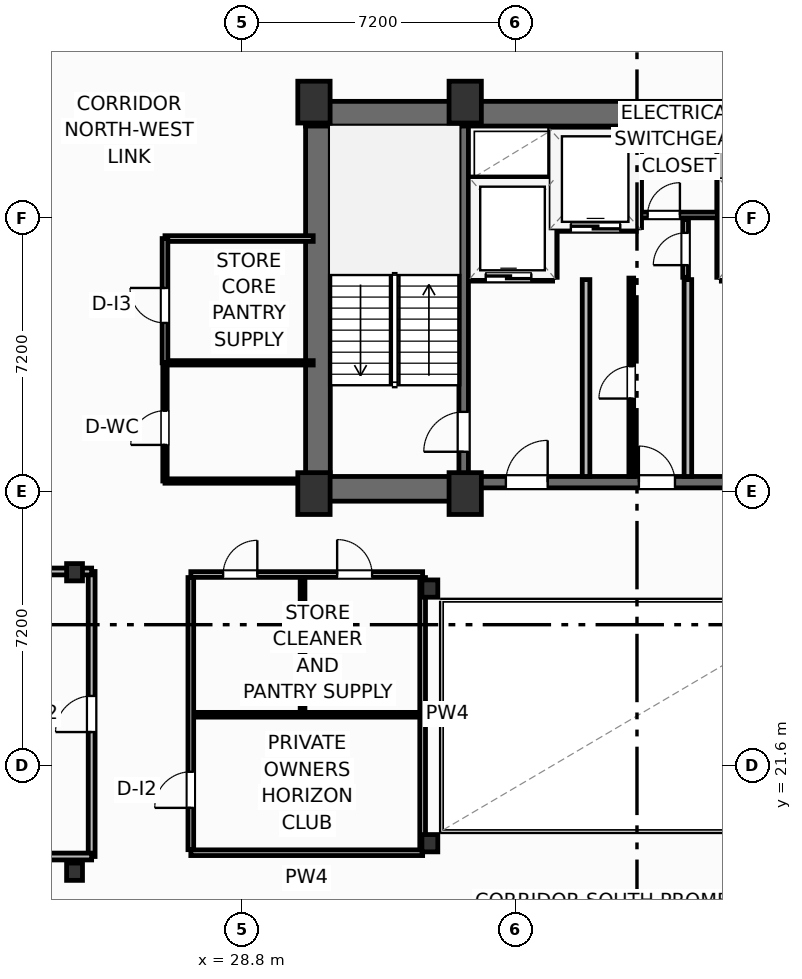
"""IFC4 building model, lengths in metres.
Left out: names, types, materials, properties, quantities, classifications, styles, units other than length and angle.
Written with IfcOpenShell. Run it as: python <this file> out.ifc"""

import sys

from ifc_helpers import new_model, si_unit, direction, frame, frame_2d, origin, origin_2d, place, context, subcontext, project, spatial, rectangle, i_section, extrude, element, fill, save


model = new_model("IFC4")
c1 = context("Model", 3, precision=1e-05, world=origin(), true_north=direction((0.0, 1.0)))
c2 = subcontext(c1, "Body", "Model", "MODEL_VIEW")
j1 = project(units=[si_unit("LENGTHUNIT", "METRE"), si_unit("PLANEANGLEUNIT", "RADIAN")], contexts=[c1])
p1 = place(None, origin())
s1 = spatial("IfcSite", under=j1, at=p1, CompositionType="ELEMENT")
p2 = place(p1, origin())
s2 = spatial("IfcBuilding", under=s1, at=p2, CompositionType="ELEMENT")
p3 = place(p2, frame((0.0, 0.0, 174.6)))
s3 = spatial("IfcBuildingStorey", under=s2, at=p3, CompositionType="ELEMENT", Elevation=174.6)
for number, where, z_axis, x_axis in (
    (1, (30.7, 28.75, 0.0), (0.0, 0.0, 1.0), (1.0, 0.0, 0.0)),
    (2, (34.68, 28.75, 0.0), (0.0, 0.0, 1.0), (1.0, 0.0, 0.0)),
    (3, (30.7, 39.05, 0.0), (0.0, 0.0, 1.0), (1.0, 0.0, 0.0)),
    (4, (34.68, 39.05, 0.0), (0.0, 0.0, 1.0), (1.0, 0.0, 0.0)),
):
    element("IfcColumn", number, at=place(p3, frame(where, z_axis=z_axis, x_axis=x_axis)), inside=s3, PredefinedType="COLUMN", context=c2, shape_type="SweptSolid", body=[
        extrude(rectangle(XDim=0.85, YDim=1.1, at=origin_2d()), origin(), (0.0, 0.0, 1.0), 3.7),
    ])
for number, where, z_axis, x_axis in (
    (5, (33.75, 19.55, 0.0), (0.0, 0.0, 1.0), (1.0, 0.0, 0.0)),
    (6, (33.75, 26.25, 0.0), (0.0, 0.0, 1.0), (1.0, 0.0, 0.0)),
    (7, (24.4, 18.8, 0.0), (0.0, 0.0, 1.0), (1.0, 0.0, 0.0)),
    (8, (24.4, 26.68, 0.0), (0.0, 0.0, 1.0), (1.0, 0.0, 0.0)),
):
    element("IfcColumn", number, at=place(p3, frame(where, z_axis=z_axis, x_axis=x_axis)), inside=s3, PredefinedType="COLUMN", context=c2, shape_type="SweptSolid", body=[
        extrude(i_section(OverallWidth=0.418, OverallDepth=0.455, WebThickness=0.042, FlangeThickness=0.068, FilletRadius=0.025, at=origin_2d()), origin(), (0.0, 0.0, 1.0), 3.7),
    ])
p4 = place(p3, frame((30.48, 38.745, 0.0), z_axis=(0.0, 0.0, 1.0), x_axis=(1.0, 0.0, 0.0)))
e9 = element("IfcWall", 9, at=p4, inside=s3, PredefinedType="SHEAR", context=c2, shape_type="SweptSolid", body=[
    extrude(rectangle(XDim=17.44, YDim=0.65, at=frame_2d((8.72, 0.0))), origin(), (0.0, 0.0, 1.0), 3.45),
])
p5 = place(p3, frame((30.805, 29.2, 0.0), z_axis=(0.0, 0.0, 1.0), x_axis=(0.0, 1.0, 0.0)))
e10 = element("IfcWall", 10, at=p5, inside=s3, PredefinedType="SHEAR", context=c2, shape_type="SweptSolid", body=[
    extrude(rectangle(XDim=9.22, YDim=0.65, at=frame_2d((4.61, 0.0))), origin(), (0.0, 0.0, 1.0), 3.45),
])
p6 = place(p3, frame((30.48, 28.875, 0.0), z_axis=(0.0, 0.0, 1.0), x_axis=(1.0, 0.0, 0.0)))
e11 = element("IfcWall", 11, at=p6, inside=s3, PredefinedType="SHEAR", context=c2, shape_type="SweptSolid", body=[
    extrude(rectangle(XDim=4.32, YDim=0.65, at=frame_2d((2.16, 0.0))), origin(), (0.0, 0.0, 1.0), 3.45),
])
p7 = place(p3, frame((34.8, 29.05, 0.0), z_axis=(0.0, 0.0, 1.0), x_axis=(1.0, 0.0, 0.0)))
e12 = element("IfcWall", 12, at=p7, inside=s3, PredefinedType="SHEAR", context=c2, shape_type="SweptSolid", body=[
    extrude(rectangle(XDim=8.8, YDim=0.3, at=frame_2d((4.4, 0.0))), origin(), (0.0, 0.0, 1.0), 3.45),
])
p8 = place(p7, frame((0.95, 0.0, 0.0)))
e13 = element("IfcOpeningElement", 13, at=p8, cuts=e12, PredefinedType="OPENING", context=c2, shape_type="SweptSolid", body=[
    extrude(rectangle(XDim=1.1, YDim=2.15, at=frame_2d((0.55, 1.075))), frame((0.0, 0.16, 0.0), z_axis=(0.0, -1.0, 0.0), x_axis=(1.0, 0.0, 0.0)), (0.0, 0.0, 1.0), 0.32),
])
p9 = place(p7, frame((6.75, 0.0, 0.0)))
e14 = element("IfcOpeningElement", 14, at=p9, cuts=e12, PredefinedType="OPENING", context=c2, shape_type="SweptSolid", body=[
    extrude(rectangle(XDim=1.1, YDim=2.15, at=frame_2d((0.55, 1.075))), frame((0.0, 0.16, 0.0), z_axis=(0.0, -1.0, 0.0), x_axis=(1.0, 0.0, 0.0)), (0.0, 0.0, 1.0), 0.32),
])
p10 = place(p7, frame((4.45, 0.0, 0.0)))
e15 = element("IfcOpeningElement", 15, at=p10, cuts=e12, PredefinedType="OPENING", context=c2, shape_type="SweptSolid", body=[
    extrude(rectangle(XDim=0.95, YDim=2.15, at=frame_2d((0.475, 1.075))), frame((0.0, 0.16, 0.0), z_axis=(0.0, -1.0, 0.0), x_axis=(1.0, 0.0, 0.0)), (0.0, 0.0, 1.0), 0.32),
])
p11 = place(p3, frame((34.64, 29.2, 0.0), z_axis=(0.0, 0.0, 1.0), x_axis=(0.0, 1.0, 0.0)))
e16 = element("IfcWall", 16, at=p11, inside=s3, PredefinedType="SHEAR", context=c2, shape_type="SweptSolid", body=[
    extrude(rectangle(XDim=9.22, YDim=0.25, at=frame_2d((4.61, 0.0))), origin(), (0.0, 0.0, 1.0), 3.45),
])
p12 = place(p11, frame((0.65, 0.0, 0.0)))
e17 = element("IfcOpeningElement", 17, at=p12, cuts=e16, PredefinedType="OPENING", context=c2, shape_type="SweptSolid", body=[
    extrude(rectangle(XDim=1.05, YDim=2.15, at=frame_2d((0.525, 1.075))), frame((0.0, 0.135, 0.0), z_axis=(0.0, -1.0, 0.0), x_axis=(1.0, 0.0, 0.0)), (0.0, 0.0, 1.0), 0.27),
])
p13 = place(p3, frame((24.85, 19.2, 0.0), z_axis=(0.0, 0.0, 1.0), x_axis=(0.0, 1.0, 0.0)))
e18 = element("IfcWall", 18, at=p13, inside=s3, PredefinedType="PARTITIONING", context=c2, shape_type="SweptSolid", body=[
    extrude(rectangle(XDim=7.5, YDim=0.18, at=frame_2d((3.75, 0.0))), origin(), (0.0, 0.0, 1.0), 3.45),
])
p14 = place(p13, frame((3.275, 0.0, 0.0)))
e19 = element("IfcOpeningElement", 19, at=p14, cuts=e18, PredefinedType="OPENING", context=c2, shape_type="SweptSolid", body=[
    extrude(rectangle(XDim=0.95, YDim=2.05, at=frame_2d((0.475, 1.025))), frame((0.0, 0.1, 0.0), z_axis=(0.0, -1.0, 0.0), x_axis=(1.0, 0.0, 0.0)), (0.0, 0.0, 1.0), 0.2),
])
p15 = place(p3, frame((4.562, 19.2, 0.0), z_axis=(0.0, 0.0, 1.0), x_axis=(1.0, 0.0, 0.0)))
e20 = element("IfcWall", 20, at=p15, inside=s3, PredefinedType="PARTITIONING", context=c2, shape_type="SweptSolid", body=[
    extrude(rectangle(XDim=20.288, YDim=0.18, at=frame_2d((10.144, 0.0))), origin(), (0.0, 0.0, 1.0), 3.45),
])
p16 = place(p3, frame((3.653, 26.7, 0.0), z_axis=(0.0, 0.0, 1.0), x_axis=(1.0, 0.0, 0.0)))
e21 = element("IfcWall", 21, at=p16, inside=s3, PredefinedType="PARTITIONING", context=c2, shape_type="SweptSolid", body=[
    extrude(rectangle(XDim=21.197, YDim=0.18, at=frame_2d((10.599, 0.0))), origin(), (0.0, 0.0, 1.0), 2.662),
])
for number, where, z_axis, x_axis in (
    (22, (37.86, 29.2, 0.0), (0.0, 0.0, 1.0), (0.0, 1.0, 0.0)),
    (23, (40.54, 29.2, 0.0), (0.0, 0.0, 1.0), (0.0, 1.0, 0.0)),
):
    element("IfcWall", number, at=place(p3, frame(where, z_axis=z_axis, x_axis=x_axis)), inside=s3, PredefinedType="PARTITIONING", context=c2, shape_type="SweptSolid", body=[
        extrude(rectangle(XDim=5.18, YDim=0.2, at=frame_2d((2.59, 0.0))), origin(), (0.0, 0.0, 1.0), 3.45),
    ])
p17 = place(p3, frame((34.8, 34.44, 0.0), z_axis=(0.0, 0.0, 1.0), x_axis=(1.0, 0.0, 0.0)))
e24 = element("IfcWall", 24, at=p17, inside=s3, PredefinedType="PARTITIONING", context=c2, shape_type="SweptSolid", body=[
    extrude(rectangle(XDim=2.18, YDim=0.2, at=frame_2d((1.09, 0.0))), origin(), (0.0, 0.0, 1.0), 3.45),
])
p18 = place(p17, frame((0.42, 0.0, 0.0)))
e25 = element("IfcOpeningElement", 25, at=p18, cuts=e24, PredefinedType="OPENING", context=c2, shape_type="SweptSolid", body=[
    extrude(rectangle(XDim=1.2, YDim=2.2, at=frame_2d((0.6, 1.1))), frame((0.0, 0.11, 0.0), z_axis=(0.0, -1.0, 0.0), x_axis=(1.0, 0.0, 0.0)), (0.0, 0.0, 1.0), 0.22),
])
p19 = place(p3, frame((34.8, 36.98, 0.0), z_axis=(0.0, 0.0, 1.0), x_axis=(1.0, 0.0, 0.0)))
e26 = element("IfcWall", 26, at=p19, inside=s3, PredefinedType="PARTITIONING", context=c2, shape_type="SweptSolid", body=[
    extrude(rectangle(XDim=2.18, YDim=0.2, at=frame_2d((1.09, 0.0))), origin(), (0.0, 0.0, 1.0), 3.45),
])
for number, where, z_axis, x_axis in (
    (27, (37.0, 34.44, 0.0), (0.0, 0.0, 1.0), (0.0, 1.0, 0.0)),
    (28, (41.4, 34.44, 0.0), (0.0, 0.0, 1.0), (0.0, 1.0, 0.0)),
):
    element("IfcWall", number, at=place(p3, frame(where, z_axis=z_axis, x_axis=x_axis)), inside=s3, PredefinedType="PARTITIONING", context=c2, shape_type="SweptSolid", body=[
        extrude(rectangle(XDim=3.9, YDim=0.2, at=frame_2d((1.95, 0.0))), origin(), (0.0, 0.0, 1.0), 3.45),
    ])
p20 = place(p3, frame((37.06, 35.75, 0.0), z_axis=(0.0, 0.0, 1.0), x_axis=(1.0, 0.0, 0.0)))
e29 = element("IfcWall", 29, at=p20, inside=s3, PredefinedType="PARTITIONING", context=c2, shape_type="SweptSolid", body=[
    extrude(rectangle(XDim=2.12, YDim=0.2, at=frame_2d((1.06, 0.0))), origin(), (0.0, 0.0, 1.0), 3.45),
])
p21 = place(p20, frame((0.4, 0.0, 0.0)))
e30 = element("IfcOpeningElement", 30, at=p21, cuts=e29, PredefinedType="OPENING", context=c2, shape_type="SweptSolid", body=[
    extrude(rectangle(XDim=1.3, YDim=2.2, at=frame_2d((0.65, 1.1))), frame((0.0, 0.11, 0.0), z_axis=(0.0, -1.0, 0.0), x_axis=(1.0, 0.0, 0.0)), (0.0, 0.0, 1.0), 0.22),
])
p22 = place(p3, frame((39.22, 35.75, 0.0), z_axis=(0.0, 0.0, 1.0), x_axis=(0.0, 1.0, 0.0)))
e31 = element("IfcWall", 31, at=p22, inside=s3, PredefinedType="PARTITIONING", context=c2, shape_type="SweptSolid", body=[
    extrude(rectangle(XDim=2.59, YDim=0.2, at=frame_2d((1.295, 0.0))), origin(), (0.0, 0.0, 1.0), 3.45),
])
p23 = place(p3, frame((39.3, 36.08, 0.0), z_axis=(0.0, 0.0, 1.0), x_axis=(1.0, 0.0, 0.0)))
e32 = element("IfcWall", 32, at=p23, inside=s3, PredefinedType="PARTITIONING", context=c2, shape_type="SweptSolid", body=[
    extrude(rectangle(XDim=2.02, YDim=0.15, at=frame_2d((1.01, 0.0))), origin(), (0.0, 0.0, 1.0), 3.45),
])
p24 = place(p23, frame((0.18, 0.0, 0.0)))
e33 = element("IfcOpeningElement", 33, at=p24, cuts=e32, PredefinedType="OPENING", context=c2, shape_type="SweptSolid", body=[
    extrude(rectangle(XDim=0.85, YDim=2.05, at=frame_2d((0.425, 1.025))), frame((0.0, 0.085, 0.0), z_axis=(0.0, -1.0, 0.0), x_axis=(1.0, 0.0, 0.0)), (0.0, 0.0, 1.0), 0.17),
])
p25 = place(p3, frame((40.48, 34.44, 0.0), z_axis=(0.0, 0.0, 1.0), x_axis=(0.0, 1.0, 0.0)))
e34 = element("IfcWall", 34, at=p25, inside=s3, PredefinedType="PARTITIONING", context=c2, shape_type="SweptSolid", body=[
    extrude(rectangle(XDim=1.52, YDim=0.15, at=frame_2d((0.76, 0.0))), origin(), (0.0, 0.0, 1.0), 3.45),
])
p26 = place(p25, frame((0.32, 0.0, 0.0)))
e35 = element("IfcOpeningElement", 35, at=p26, cuts=e34, PredefinedType="OPENING", context=c2, shape_type="SweptSolid", body=[
    extrude(rectangle(XDim=0.85, YDim=2.05, at=frame_2d((0.425, 1.025))), frame((0.0, 0.085, 0.0), z_axis=(0.0, -1.0, 0.0), x_axis=(1.0, 0.0, 0.0)), (0.0, 0.0, 1.0), 0.17),
])
p27 = place(p3, frame((39.05, 29.2, 0.0), z_axis=(0.0, 0.0, 1.0), x_axis=(0.0, 1.0, 0.0)))
e36 = element("IfcWall", 36, at=p27, inside=s3, PredefinedType="PARTITIONING", context=c2, shape_type="SweptSolid", body=[
    extrude(rectangle(XDim=5.22, YDim=0.125, at=frame_2d((2.61, 0.0))), origin(), (0.0, 0.0, 1.0), 3.45),
])
p28 = place(p27, frame((2.05, 0.0, 0.0)))
e37 = element("IfcOpeningElement", 37, at=p28, cuts=e36, PredefinedType="OPENING", context=c2, shape_type="SweptSolid", body=[
    extrude(rectangle(XDim=0.85, YDim=2.05, at=frame_2d((0.425, 1.025))), frame((0.0, 0.073, 0.0), z_axis=(0.0, -1.0, 0.0), x_axis=(1.0, 0.0, 0.0)), (0.0, 0.0, 1.0), 0.145),
])
p29 = place(p3, frame((27.46, 19.3, 0.0), z_axis=(0.0, 0.0, 1.0), x_axis=(1.0, 0.0, 0.0)))
e38 = element("IfcWall", 38, at=p29, inside=s3, PredefinedType="PARTITIONING", context=c2, shape_type="SweptSolid", body=[
    extrude(rectangle(XDim=6.1, YDim=0.15, at=frame_2d((3.05, 0.0))), origin(), (0.0, 0.0, 1.0), 2.662),
])
p30 = place(p3, frame((27.46, 26.62, 0.0), z_axis=(0.0, 0.0, 1.0), x_axis=(1.0, 0.0, 0.0)))
e39 = element("IfcWall", 39, at=p30, inside=s3, PredefinedType="PARTITIONING", context=c2, shape_type="SweptSolid", body=[
    extrude(rectangle(XDim=6.1, YDim=0.15, at=frame_2d((3.05, 0.0))), origin(), (0.0, 0.0, 1.0), 2.662),
])
p31 = place(p30, frame((0.85, 0.0, 0.0)))
e40 = element("IfcOpeningElement", 40, at=p31, cuts=e39, PredefinedType="OPENING", context=c2, shape_type="SweptSolid", body=[
    extrude(rectangle(XDim=0.9, YDim=2.05, at=frame_2d((0.45, 1.025))), frame((0.0, 0.085, 0.0), z_axis=(0.0, -1.0, 0.0), x_axis=(1.0, 0.0, 0.0)), (0.0, 0.0, 1.0), 0.17),
])
p32 = place(p30, frame((3.85, 0.0, 0.0)))
e41 = element("IfcOpeningElement", 41, at=p32, cuts=e39, PredefinedType="OPENING", context=c2, shape_type="SweptSolid", body=[
    extrude(rectangle(XDim=0.92, YDim=2.05, at=frame_2d((0.46, 1.025))), frame((0.0, 0.085, 0.0), z_axis=(0.0, -1.0, 0.0), x_axis=(1.0, 0.0, 0.0)), (0.0, 0.0, 1.0), 0.17),
])
p33 = place(p3, frame((27.52, 22.93, 0.0), z_axis=(0.0, 0.0, 1.0), x_axis=(1.0, 0.0, 0.0)))
e42 = element("IfcWall", 42, at=p33, inside=s3, PredefinedType="PARTITIONING", context=c2, shape_type="SweptSolid", body=[
    extrude(rectangle(XDim=6.0, YDim=0.125, at=frame_2d((3.0, 0.0))), origin(), (0.0, 0.0, 1.0), 3.45),
])
p34 = place(p3, frame((30.4, 23.0, 0.0), z_axis=(0.0, 0.0, 1.0), x_axis=(0.0, 1.0, 0.0)))
e43 = element("IfcWall", 43, at=p34, inside=s3, PredefinedType="PARTITIONING", context=c2, shape_type="SweptSolid", body=[
    extrude(rectangle(XDim=3.54, YDim=0.125, at=frame_2d((1.77, 0.0))), origin(), (0.0, 0.0, 1.0), 3.45),
])
p35 = place(p3, frame((27.46, 19.38, 0.0), z_axis=(0.0, 0.0, 1.0), x_axis=(0.0, 1.0, 0.0)))
e44 = element("IfcWall", 44, at=p35, inside=s3, PredefinedType="PARTITIONING", context=c2, shape_type="SweptSolid", body=[
    extrude(rectangle(XDim=7.16, YDim=0.15, at=frame_2d((3.58, 0.0))), origin(), (0.0, 0.0, 1.0), 3.45),
])
p36 = place(p35, frame((1.1, 0.0, 0.0)))
e45 = element("IfcOpeningElement", 45, at=p36, cuts=e44, PredefinedType="OPENING", context=c2, shape_type="SweptSolid", body=[
    extrude(rectangle(XDim=0.95, YDim=2.05, at=frame_2d((0.475, 1.025))), frame((0.0, 0.085, 0.0), z_axis=(0.0, -1.0, 0.0), x_axis=(1.0, 0.0, 0.0)), (0.0, 0.0, 1.0), 0.17),
])
p37 = place(p3, frame((33.56, 19.38, 0.0), z_axis=(0.0, 0.0, 1.0), x_axis=(0.0, 1.0, 0.0)))
e46 = element("IfcWall", 46, at=p37, inside=s3, PredefinedType="PARTITIONING", context=c2, shape_type="SweptSolid", body=[
    extrude(rectangle(XDim=7.16, YDim=0.15, at=frame_2d((3.58, 0.0))), origin(), (0.0, 0.0, 1.0), 2.824),
])
p38 = place(p3, frame((26.8, 32.19, 0.0), z_axis=(0.0, 0.0, 1.0), x_axis=(1.0, 0.0, 0.0)))
e47 = element("IfcWall", 47, at=p38, inside=s3, PredefinedType="PARTITIONING", context=c2, shape_type="SweptSolid", body=[
    extrude(rectangle(XDim=3.88, YDim=0.115, at=frame_2d((1.94, 0.0))), origin(), (0.0, 0.0, 1.0), 3.45),
])
p39 = place(p3, frame((26.78, 29.08, 0.0), z_axis=(0.0, 0.0, 1.0), x_axis=(1.0, 0.0, 0.0)))
e48 = element("IfcWall", 48, at=p39, inside=s3, PredefinedType="PARTITIONING", context=c2, shape_type="SweptSolid", body=[
    extrude(rectangle(XDim=3.7, YDim=0.115, at=frame_2d((1.85, 0.0))), origin(), (0.0, 0.0, 1.0), 3.45),
])
p40 = place(p3, frame((26.78, 35.46, 0.0), z_axis=(0.0, 0.0, 1.0), x_axis=(1.0, 0.0, 0.0)))
e49 = element("IfcWall", 49, at=p40, inside=s3, PredefinedType="PARTITIONING", context=c2, shape_type="SweptSolid", body=[
    extrude(rectangle(XDim=3.9, YDim=0.15, at=frame_2d((1.95, 0.0))), origin(), (0.0, 0.0, 1.0), 3.45),
])
p41 = place(p3, frame((26.78, 29.08, 0.0), z_axis=(0.0, 0.0, 1.0), x_axis=(0.0, 1.0, 0.0)))
e50 = element("IfcWall", 50, at=p41, inside=s3, PredefinedType="PARTITIONING", context=c2, shape_type="SweptSolid", body=[
    extrude(rectangle(XDim=3.11, YDim=0.115, at=frame_2d((1.555, 0.0))), origin(), (0.0, 0.0, 1.0), 3.45),
])
p42 = place(p41, frame((0.95, 0.0, 0.0)))
e51 = element("IfcOpeningElement", 51, at=p42, cuts=e50, PredefinedType="OPENING", context=c2, shape_type="SweptSolid", body=[
    extrude(rectangle(XDim=0.9, YDim=2.05, at=frame_2d((0.45, 1.025))), frame((0.0, 0.067, 0.0), z_axis=(0.0, -1.0, 0.0), x_axis=(1.0, 0.0, 0.0)), (0.0, 0.0, 1.0), 0.135),
])
p43 = place(p3, frame((26.78, 32.19, 0.0), z_axis=(0.0, 0.0, 1.0), x_axis=(0.0, 1.0, 0.0)))
e52 = element("IfcWall", 52, at=p43, inside=s3, PredefinedType="PARTITIONING", context=c2, shape_type="SweptSolid", body=[
    extrude(rectangle(XDim=3.27, YDim=0.15, at=frame_2d((1.635, 0.0))), origin(), (0.0, 0.0, 1.0), 3.45),
])
p44 = place(p43, frame((1.05, 0.0, 0.0)))
e53 = element("IfcOpeningElement", 53, at=p44, cuts=e52, PredefinedType="OPENING", context=c2, shape_type="SweptSolid", body=[
    extrude(rectangle(XDim=0.92, YDim=2.05, at=frame_2d((0.46, 1.025))), frame((0.0, 0.085, 0.0), z_axis=(0.0, -1.0, 0.0), x_axis=(1.0, 0.0, 0.0)), (0.0, 0.0, 1.0), 0.17),
])
p45 = place(p14, origin())
e54 = element("IfcDoor", 54, at=p45, inside=s3, OperationType="SINGLE_SWING_LEFT", PredefinedType="DOOR", context=c2, shape_type="SweptSolid", body=[
    extrude(rectangle(XDim=0.95, YDim=2.05, at=frame_2d((0.475, 1.025))), frame((0.0, 0.025, 0.0), z_axis=(0.0, -1.0, 0.0), x_axis=(1.0, 0.0, 0.0)), (0.0, 0.0, 1.0), 0.05),
])
fill(e19, e54)
p46 = place(p12, origin())
e55 = element("IfcDoor", 55, at=p46, inside=s3, OperationType="SINGLE_SWING_LEFT", PredefinedType="DOOR", context=c2, shape_type="SweptSolid", body=[
    extrude(rectangle(XDim=1.05, YDim=2.15, at=frame_2d((0.525, 1.075))), frame((0.0, 0.025, 0.0), z_axis=(0.0, -1.0, 0.0), x_axis=(1.0, 0.0, 0.0)), (0.0, 0.0, 1.0), 0.05),
])
fill(e17, e55)
p47 = place(p8, origin())
e56 = element("IfcDoor", 56, at=p47, inside=s3, OperationType="SINGLE_SWING_RIGHT", PredefinedType="DOOR", context=c2, shape_type="SweptSolid", body=[
    extrude(rectangle(XDim=1.1, YDim=2.15, at=frame_2d((0.55, 1.075))), frame((0.0, 0.025, 0.0), z_axis=(0.0, -1.0, 0.0), x_axis=(1.0, 0.0, 0.0)), (0.0, 0.0, 1.0), 0.05),
])
fill(e13, e56)
p48 = place(p18, origin())
e57 = element("IfcDoor", 57, at=p48, inside=s3, OperationType="SLIDING_TO_LEFT", PredefinedType="DOOR", context=c2, shape_type="SweptSolid", body=[
    extrude(rectangle(XDim=1.2, YDim=2.2, at=frame_2d((0.6, 1.1))), frame((0.0, 0.025, 0.0), z_axis=(0.0, -1.0, 0.0), x_axis=(1.0, 0.0, 0.0)), (0.0, 0.0, 1.0), 0.05),
])
fill(e25, e57)
p49 = place(p21, origin())
e58 = element("IfcDoor", 58, at=p49, inside=s3, OperationType="SLIDING_TO_LEFT", PredefinedType="DOOR", context=c2, shape_type="SweptSolid", body=[
    extrude(rectangle(XDim=1.3, YDim=2.2, at=frame_2d((0.65, 1.1))), frame((0.0, 0.025, 0.0), z_axis=(0.0, -1.0, 0.0), x_axis=(1.0, 0.0, 0.0)), (0.0, 0.0, 1.0), 0.05),
])
fill(e30, e58)
p50 = place(p24, origin())
e59 = element("IfcDoor", 59, at=p50, inside=s3, OperationType="SINGLE_SWING_RIGHT", PredefinedType="DOOR", context=c2, shape_type="SweptSolid", body=[
    extrude(rectangle(XDim=0.85, YDim=2.05, at=frame_2d((0.425, 1.025))), frame((0.0, 0.025, 0.0), z_axis=(0.0, -1.0, 0.0), x_axis=(1.0, 0.0, 0.0)), (0.0, 0.0, 1.0), 0.05),
])
fill(e33, e59)
p51 = place(p26, origin())
e60 = element("IfcDoor", 60, at=p51, inside=s3, OperationType="SINGLE_SWING_LEFT", PredefinedType="DOOR", context=c2, shape_type="SweptSolid", body=[
    extrude(rectangle(XDim=0.85, YDim=2.05, at=frame_2d((0.425, 1.025))), frame((0.0, 0.025, 0.0), z_axis=(0.0, -1.0, 0.0), x_axis=(1.0, 0.0, 0.0)), (0.0, 0.0, 1.0), 0.05),
])
fill(e35, e60)
p52 = place(p28, origin())
e61 = element("IfcDoor", 61, at=p52, inside=s3, OperationType="SINGLE_SWING_LEFT", PredefinedType="DOOR", context=c2, shape_type="SweptSolid", body=[
    extrude(rectangle(XDim=0.85, YDim=2.05, at=frame_2d((0.425, 1.025))), frame((0.0, 0.025, 0.0), z_axis=(0.0, -1.0, 0.0), x_axis=(1.0, 0.0, 0.0)), (0.0, 0.0, 1.0), 0.05),
])
fill(e37, e61)
p53 = place(p10, origin())
e62 = element("IfcDoor", 62, at=p53, inside=s3, OperationType="SINGLE_SWING_LEFT", PredefinedType="DOOR", context=c2, shape_type="SweptSolid", body=[
    extrude(rectangle(XDim=0.95, YDim=2.15, at=frame_2d((0.475, 1.075))), frame((0.0, 0.025, 0.0), z_axis=(0.0, -1.0, 0.0), x_axis=(1.0, 0.0, 0.0)), (0.0, 0.0, 1.0), 0.05),
])
fill(e15, e62)
p54 = place(p31, origin())
e63 = element("IfcDoor", 63, at=p54, inside=s3, OperationType="SINGLE_SWING_RIGHT", PredefinedType="DOOR", context=c2, shape_type="SweptSolid", body=[
    extrude(rectangle(XDim=0.9, YDim=2.05, at=frame_2d((0.45, 1.025))), frame((0.0, 0.025, 0.0), z_axis=(0.0, -1.0, 0.0), x_axis=(1.0, 0.0, 0.0)), (0.0, 0.0, 1.0), 0.05),
])
fill(e40, e63)
p55 = place(p32, origin())
e64 = element("IfcDoor", 64, at=p55, inside=s3, OperationType="SINGLE_SWING_LEFT", PredefinedType="DOOR", context=c2, shape_type="SweptSolid", body=[
    extrude(rectangle(XDim=0.92, YDim=2.05, at=frame_2d((0.46, 1.025))), frame((0.0, 0.025, 0.0), z_axis=(0.0, -1.0, 0.0), x_axis=(1.0, 0.0, 0.0)), (0.0, 0.0, 1.0), 0.05),
])
fill(e41, e64)
p56 = place(p36, origin())
e65 = element("IfcDoor", 65, at=p56, inside=s3, OperationType="SINGLE_SWING_LEFT", PredefinedType="DOOR", context=c2, shape_type="SweptSolid", body=[
    extrude(rectangle(XDim=0.95, YDim=2.05, at=frame_2d((0.475, 1.025))), frame((0.0, 0.025, 0.0), z_axis=(0.0, -1.0, 0.0), x_axis=(1.0, 0.0, 0.0)), (0.0, 0.0, 1.0), 0.05),
])
fill(e45, e65)
p57 = place(p42, origin())
e66 = element("IfcDoor", 66, at=p57, inside=s3, OperationType="SINGLE_SWING_LEFT", PredefinedType="DOOR", context=c2, shape_type="SweptSolid", body=[
    extrude(rectangle(XDim=0.9, YDim=2.05, at=frame_2d((0.45, 1.025))), frame((0.0, 0.025, 0.0), z_axis=(0.0, -1.0, 0.0), x_axis=(1.0, 0.0, 0.0)), (0.0, 0.0, 1.0), 0.05),
])
fill(e51, e66)
p58 = place(p44, origin())
e67 = element("IfcDoor", 67, at=p58, inside=s3, OperationType="SINGLE_SWING_RIGHT", PredefinedType="DOOR", context=c2, shape_type="SweptSolid", body=[
    extrude(rectangle(XDim=0.92, YDim=2.05, at=frame_2d((0.46, 1.025))), frame((0.0, 0.025, 0.0), z_axis=(0.0, -1.0, 0.0), x_axis=(1.0, 0.0, 0.0)), (0.0, 0.0, 1.0), 0.05),
])
fill(e53, e67)
save(model, sys.argv[1])
